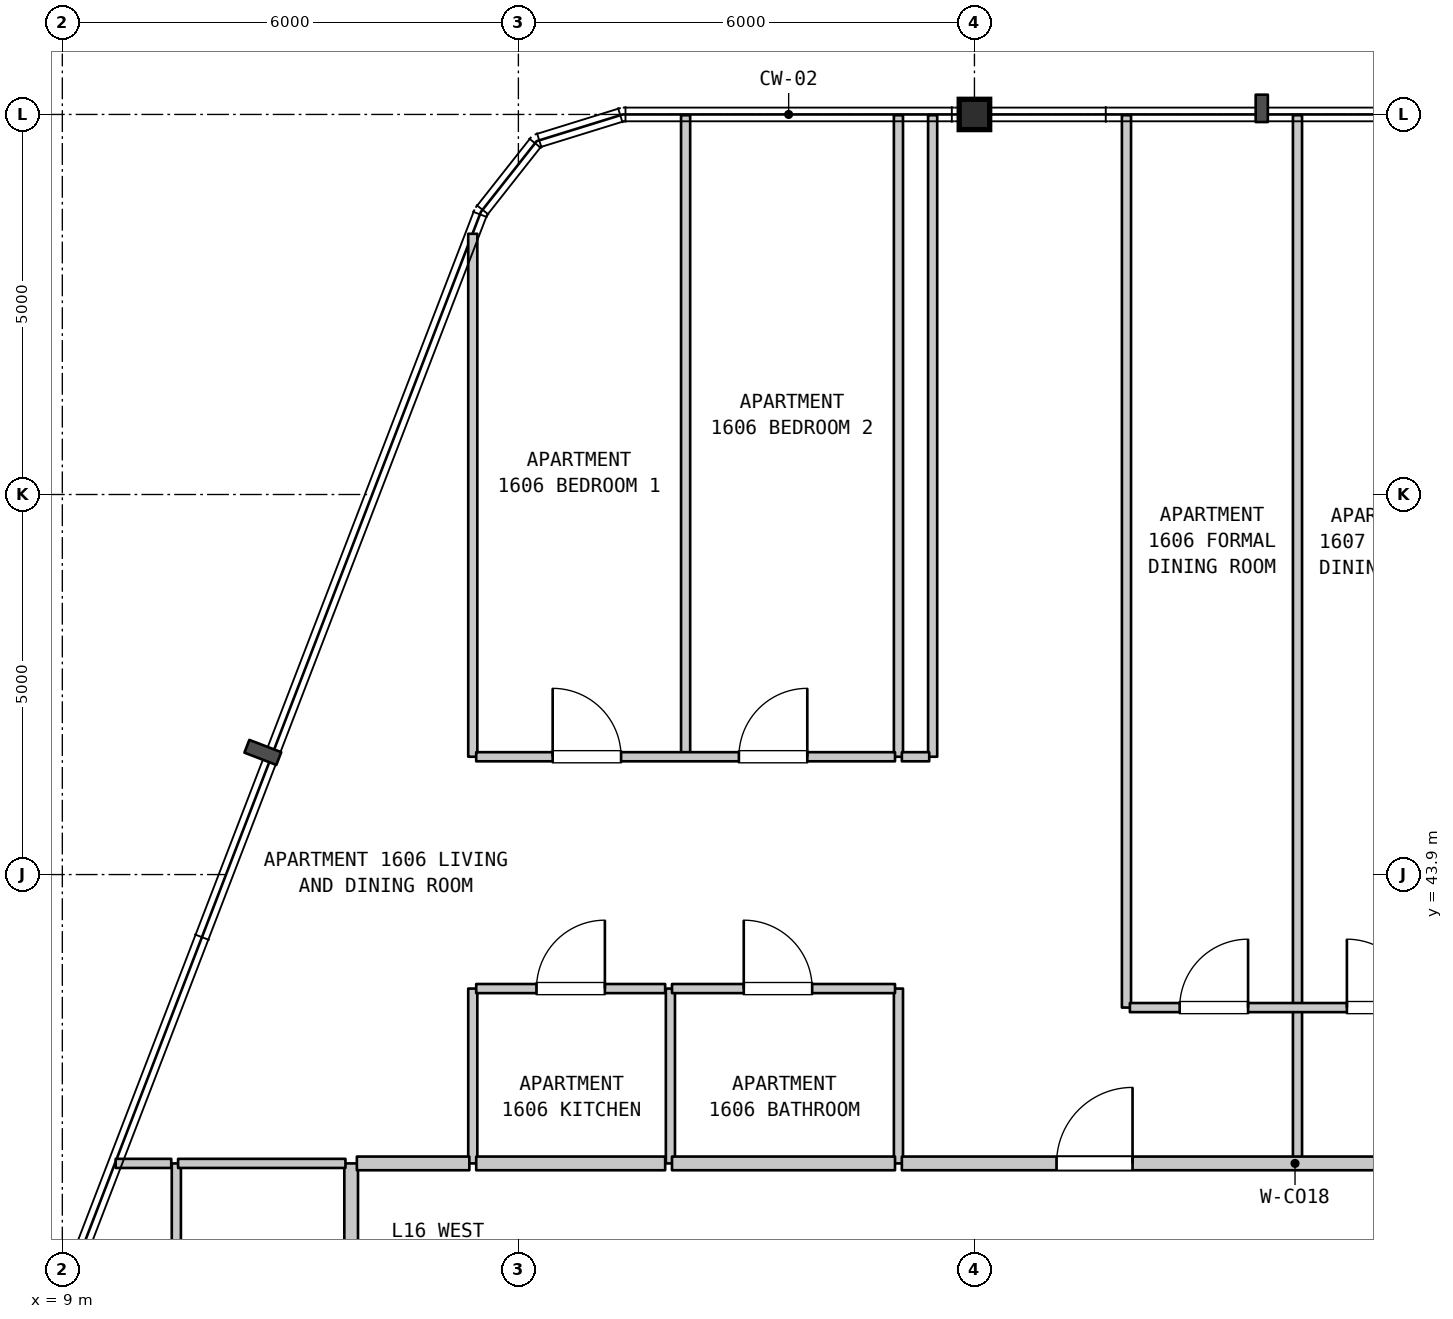
"""IFC4 building model, lengths in metres.
Left out: names, types, materials, properties, quantities, classifications, styles, units other than length and angle.
Written with IfcOpenShell. Run it as: python <this file> out.ifc"""

import sys

from ifc_helpers import new_model, si_unit, direction, frame, frame_2d, origin, origin_2d, place, context, subcontext, project, spatial, rectangle, i_section, extrude, element, fill, save


model = new_model("IFC4")
c1 = context("Model", 3, precision=1e-05, world=origin(), true_north=direction((0.0, 1.0)))
c2 = subcontext(c1, "Body", "Model", "MODEL_VIEW")
j1 = project(units=[si_unit("LENGTHUNIT", "METRE"), si_unit("PLANEANGLEUNIT", "RADIAN")], contexts=[c1])
p1 = place(None, origin())
s1 = spatial("IfcSite", under=j1, at=p1, CompositionType="ELEMENT")
p2 = place(p1, origin())
s2 = spatial("IfcBuilding", under=s1, at=p2, CompositionType="ELEMENT")
p3 = place(p2, frame((0.0, 0.0, 70.1)))
s3 = spatial("IfcBuildingStorey", under=s2, at=p3, CompositionType="ELEMENT", Elevation=70.1)
p4 = place(p3, frame((21.0, 53.9, 0.0), z_axis=(0.0, 0.0, 1.0), x_axis=(1.0, 0.0, 0.0)))
e1 = element("IfcColumn", 1, at=p4, inside=s3, PredefinedType="COLUMN", context=c2, shape_type="SweptSolid", body=[
    extrude(i_section(OverallWidth=0.401, OverallDepth=0.399, WebThickness=0.025, FlangeThickness=0.04, FilletRadius=0.015, at=origin_2d()), origin(), (0.0, 0.0, 1.0), 3.7),
])
p5 = place(p3, frame((10.5, 31.45, 0.0), z_axis=(0.0, 0.0, 1.0), x_axis=(0.0, 1.0, 0.0)))
e2 = element("IfcWall", 2, at=p5, inside=s3, PredefinedType="PARTITIONING", context=c2, shape_type="SweptSolid", body=[
    extrude(rectangle(XDim=8.65, YDim=0.12, at=frame_2d((4.325, 0.0))), origin(), (0.0, 0.0, 1.0), 3.385),
])
p6 = place(p3, frame((12.8, 31.45, 0.0), z_axis=(0.0, 0.0, 1.0), x_axis=(0.0, 1.0, 0.0)))
e3 = element("IfcWall", 3, at=p6, inside=s3, PredefinedType="STANDARD", context=c2, shape_type="SweptSolid", body=[
    extrude(rectangle(XDim=8.65, YDim=0.18, at=frame_2d((4.325, 0.0))), origin(), (0.0, 0.0, 1.0), 3.385),
])
p7 = place(p3, frame((14.4, 40.1, 0.0), z_axis=(0.0, 0.0, 1.0), x_axis=(0.0, 1.0, 0.0)))
e4 = element("IfcWall", 4, at=p7, inside=s3, PredefinedType="PARTITIONING", context=c2, shape_type="SweptSolid", body=[
    extrude(rectangle(XDim=2.3, YDim=0.12, at=frame_2d((1.15, 0.0))), origin(), (0.0, 0.0, 1.0), 3.385),
])
p8 = place(p3, frame((14.4, 45.45, 0.0), z_axis=(0.0, 0.0, 1.0), x_axis=(0.0, 1.0, 0.0)))
e5 = element("IfcWall", 5, at=p8, inside=s3, PredefinedType="PARTITIONING", context=c2, shape_type="SweptSolid", body=[
    extrude(rectangle(XDim=6.88, YDim=0.12, at=frame_2d((3.44, 0.0))), origin(), (0.0, 0.0, 1.0), 3.385),
])
p9 = place(p3, frame((17.0, 40.1, 0.0), z_axis=(0.0, 0.0, 1.0), x_axis=(0.0, 1.0, 0.0)))
e6 = element("IfcWall", 6, at=p9, inside=s3, PredefinedType="PARTITIONING", context=c2, shape_type="SweptSolid", body=[
    extrude(rectangle(XDim=2.3, YDim=0.12, at=frame_2d((1.15, 0.0))), origin(), (0.0, 0.0, 1.0), 3.385),
])
p10 = place(p3, frame((17.2, 45.45, 0.0), z_axis=(0.0, 0.0, 1.0), x_axis=(0.0, 1.0, 0.0)))
e7 = element("IfcWall", 7, at=p10, inside=s3, PredefinedType="PARTITIONING", context=c2, shape_type="SweptSolid", body=[
    extrude(rectangle(XDim=8.44, YDim=0.12, at=frame_2d((4.22, 0.0))), origin(), (0.0, 0.0, 1.0), 3.385),
])
p11 = place(p3, frame((20.0, 40.1, 0.0), z_axis=(0.0, 0.0, 1.0), x_axis=(0.0, 1.0, 0.0)))
e8 = element("IfcWall", 8, at=p11, inside=s3, PredefinedType="PARTITIONING", context=c2, shape_type="SweptSolid", body=[
    extrude(rectangle(XDim=2.3, YDim=0.12, at=frame_2d((1.15, 0.0))), origin(), (0.0, 0.0, 1.0), 3.385),
])
for number, where, z_axis, x_axis in (
    (9, (20.0, 45.45, 0.0), (0.0, 0.0, 1.0), (0.0, 1.0, 0.0)),
    (10, (20.45, 45.45, 0.0), (0.0, 0.0, 1.0), (0.0, 1.0, 0.0)),
):
    element("IfcWall", number, at=place(p3, frame(where, z_axis=z_axis, x_axis=x_axis)), inside=s3, PredefinedType="PARTITIONING", context=c2, shape_type="SweptSolid", body=[
        extrude(rectangle(XDim=8.44, YDim=0.12, at=frame_2d((4.22, 0.0))), origin(), (0.0, 0.0, 1.0), 3.385),
    ])
p12 = place(p3, frame((23.0, 42.15, 0.0), z_axis=(0.0, 0.0, 1.0), x_axis=(0.0, 1.0, 0.0)))
e11 = element("IfcWall", 11, at=p12, inside=s3, PredefinedType="PARTITIONING", context=c2, shape_type="SweptSolid", body=[
    extrude(rectangle(XDim=11.74, YDim=0.12, at=frame_2d((5.87, 0.0))), origin(), (0.0, 0.0, 1.0), 3.385),
])
p13 = place(p3, frame((25.25, 40.1, 0.0), z_axis=(0.0, 0.0, 1.0), x_axis=(0.0, 1.0, 0.0)))
e12 = element("IfcWall", 12, at=p13, inside=s3, PredefinedType="PARTITIONING", context=c2, shape_type="SweptSolid", body=[
    extrude(rectangle(XDim=2.05, YDim=0.12, at=frame_2d((1.025, 0.0))), origin(), (0.0, 0.0, 1.0), 3.385),
])
p14 = place(p3, frame((25.25, 42.15, 0.0), z_axis=(0.0, 0.0, 1.0), x_axis=(0.0, 1.0, 0.0)))
e13 = element("IfcWall", 13, at=p14, inside=s3, PredefinedType="PARTITIONING", context=c2, shape_type="SweptSolid", body=[
    extrude(rectangle(XDim=11.74, YDim=0.12, at=frame_2d((5.87, 0.0))), origin(), (0.0, 0.0, 1.0), 3.385),
])
p15 = place(p3, frame((9.702, 40.1, 0.0), z_axis=(0.0, 0.0, 1.0), x_axis=(1.0, 0.0, 0.0)))
e14 = element("IfcWall", 14, at=p15, inside=s3, PredefinedType="PARTITIONING", context=c2, shape_type="SweptSolid", body=[
    extrude(rectangle(XDim=0.731, YDim=0.12, at=frame_2d((0.366, 0.0))), origin(), (0.0, 0.0, 1.0), 3.385),
])
p16 = place(p3, frame((10.523, 40.1, 0.0), z_axis=(0.0, 0.0, 1.0), x_axis=(1.0, 0.0, 0.0)))
e15 = element("IfcWall", 15, at=p16, inside=s3, PredefinedType="PARTITIONING", context=c2, shape_type="SweptSolid", body=[
    extrude(rectangle(XDim=2.202, YDim=0.12, at=frame_2d((1.101, 0.0))), origin(), (0.0, 0.0, 1.0), 3.385),
])
p17 = place(p3, frame((12.875, 40.1, 0.0), z_axis=(0.0, 0.0, 1.0), x_axis=(1.0, 0.0, 0.0)))
e16 = element("IfcWall", 16, at=p17, inside=s3, PredefinedType="STANDARD", context=c2, shape_type="SweptSolid", body=[
    extrude(rectangle(XDim=1.48, YDim=0.18, at=frame_2d((0.74, 0.0))), origin(), (0.0, 0.0, 1.0), 3.385),
])
p18 = place(p3, frame((14.445, 40.1, 0.0), z_axis=(0.0, 0.0, 1.0), x_axis=(1.0, 0.0, 0.0)))
e17 = element("IfcWall", 17, at=p18, inside=s3, PredefinedType="STANDARD", context=c2, shape_type="SweptSolid", body=[
    extrude(rectangle(XDim=2.486, YDim=0.18, at=frame_2d((1.243, 0.0))), origin(), (0.0, 0.0, 1.0), 3.385),
])
p19 = place(p3, frame((17.021, 40.1, 0.0), z_axis=(0.0, 0.0, 1.0), x_axis=(1.0, 0.0, 0.0)))
e18 = element("IfcWall", 18, at=p19, inside=s3, PredefinedType="STANDARD", context=c2, shape_type="SweptSolid", body=[
    extrude(rectangle(XDim=2.934, YDim=0.18, at=frame_2d((1.467, 0.0))), origin(), (0.0, 0.0, 1.0), 3.385),
])
p20 = place(p3, frame((20.045, 40.1, 0.0), z_axis=(0.0, 0.0, 1.0), x_axis=(1.0, 0.0, 0.0)))
e19 = element("IfcWall", 19, at=p20, inside=s3, PredefinedType="STANDARD", context=c2, shape_type="SweptSolid", body=[
    extrude(rectangle(XDim=10.345, YDim=0.18, at=frame_2d((5.172, 0.0))), origin(), (0.0, 0.0, 1.0), 3.385),
])
p21 = place(p20, frame((2.035, 0.0, 0.0)))
e20 = element("IfcOpeningElement", 20, at=p21, cuts=e19, PredefinedType="OPENING", context=c2, shape_type="SweptSolid", body=[
    extrude(rectangle(XDim=1.0, YDim=2.15, at=frame_2d((0.5, 1.075))), frame((0.0, 0.1, 0.0), z_axis=(0.0, -1.0, 0.0), x_axis=(1.0, 0.0, 0.0)), (0.0, 0.0, 1.0), 0.2),
])
p22 = place(p20, frame((7.235, 0.0, 0.0)))
e21 = element("IfcOpeningElement", 21, at=p22, cuts=e19, PredefinedType="OPENING", context=c2, shape_type="SweptSolid", body=[
    extrude(rectangle(XDim=1.0, YDim=2.15, at=frame_2d((0.5, 1.075))), frame((0.0, 0.1, 0.0), z_axis=(0.0, -1.0, 0.0), x_axis=(1.0, 0.0, 0.0)), (0.0, 0.0, 1.0), 0.2),
])
p23 = place(p3, frame((23.045, 42.15, 0.0), z_axis=(0.0, 0.0, 1.0), x_axis=(1.0, 0.0, 0.0)))
e22 = element("IfcWall", 22, at=p23, inside=s3, PredefinedType="PARTITIONING", context=c2, shape_type="SweptSolid", body=[
    extrude(rectangle(XDim=4.41, YDim=0.12, at=frame_2d((2.205, 0.0))), origin(), (0.0, 0.0, 1.0), 3.385),
])
p24 = place(p23, frame((0.655, 0.0, 0.0)))
e23 = element("IfcOpeningElement", 23, at=p24, cuts=e22, PredefinedType="OPENING", context=c2, shape_type="SweptSolid", body=[
    extrude(rectangle(XDim=0.9, YDim=2.15, at=frame_2d((0.45, 1.075))), frame((0.0, 0.07, 0.0), z_axis=(0.0, -1.0, 0.0), x_axis=(1.0, 0.0, 0.0)), (0.0, 0.0, 1.0), 0.14),
])
p25 = place(p23, frame((2.855, 0.0, 0.0)))
e24 = element("IfcOpeningElement", 24, at=p25, cuts=e22, PredefinedType="OPENING", context=c2, shape_type="SweptSolid", body=[
    extrude(rectangle(XDim=0.9, YDim=2.15, at=frame_2d((0.45, 1.075))), frame((0.0, 0.07, 0.0), z_axis=(0.0, -1.0, 0.0), x_axis=(1.0, 0.0, 0.0)), (0.0, 0.0, 1.0), 0.14),
])
p26 = place(p3, frame((14.445, 42.4, 0.0), z_axis=(0.0, 0.0, 1.0), x_axis=(1.0, 0.0, 0.0)))
e25 = element("IfcWall", 25, at=p26, inside=s3, PredefinedType="PARTITIONING", context=c2, shape_type="SweptSolid", body=[
    extrude(rectangle(XDim=2.486, YDim=0.12, at=frame_2d((1.243, 0.0))), origin(), (0.0, 0.0, 1.0), 3.385),
])
p27 = place(p26, frame((0.793, 0.0, 0.0)))
e26 = element("IfcOpeningElement", 26, at=p27, cuts=e25, PredefinedType="OPENING", context=c2, shape_type="SweptSolid", body=[
    extrude(rectangle(XDim=0.9, YDim=2.15, at=frame_2d((0.45, 1.075))), frame((0.0, 0.07, 0.0), z_axis=(0.0, -1.0, 0.0), x_axis=(1.0, 0.0, 0.0)), (0.0, 0.0, 1.0), 0.14),
])
p28 = place(p3, frame((17.021, 42.4, 0.0), z_axis=(0.0, 0.0, 1.0), x_axis=(1.0, 0.0, 0.0)))
e27 = element("IfcWall", 27, at=p28, inside=s3, PredefinedType="PARTITIONING", context=c2, shape_type="SweptSolid", body=[
    extrude(rectangle(XDim=2.934, YDim=0.12, at=frame_2d((1.467, 0.0))), origin(), (0.0, 0.0, 1.0), 3.385),
])
p29 = place(p28, frame((0.944, 0.0, 0.0)))
e28 = element("IfcOpeningElement", 28, at=p29, cuts=e27, PredefinedType="OPENING", context=c2, shape_type="SweptSolid", body=[
    extrude(rectangle(XDim=0.9, YDim=2.1, at=frame_2d((0.45, 1.05))), frame((0.0, 0.07, 0.0), z_axis=(0.0, -1.0, 0.0), x_axis=(1.0, 0.0, 0.0)), (0.0, 0.0, 1.0), 0.14),
])
p30 = place(p3, frame((14.445, 45.45, 0.0), z_axis=(0.0, 0.0, 1.0), x_axis=(1.0, 0.0, 0.0)))
e29 = element("IfcWall", 29, at=p30, inside=s3, PredefinedType="PARTITIONING", context=c2, shape_type="SweptSolid", body=[
    extrude(rectangle(XDim=5.51, YDim=0.12, at=frame_2d((2.755, 0.0))), origin(), (0.0, 0.0, 1.0), 3.385),
])
p31 = place(p30, frame((1.006, 0.0, 0.0)))
e30 = element("IfcOpeningElement", 30, at=p31, cuts=e29, PredefinedType="OPENING", context=c2, shape_type="SweptSolid", body=[
    extrude(rectangle(XDim=0.9, YDim=2.15, at=frame_2d((0.45, 1.075))), frame((0.0, 0.07, 0.0), z_axis=(0.0, -1.0, 0.0), x_axis=(1.0, 0.0, 0.0)), (0.0, 0.0, 1.0), 0.14),
])
p32 = place(p30, frame((3.456, 0.0, 0.0)))
e31 = element("IfcOpeningElement", 31, at=p32, cuts=e29, PredefinedType="OPENING", context=c2, shape_type="SweptSolid", body=[
    extrude(rectangle(XDim=0.9, YDim=2.15, at=frame_2d((0.45, 1.075))), frame((0.0, 0.07, 0.0), z_axis=(0.0, -1.0, 0.0), x_axis=(1.0, 0.0, 0.0)), (0.0, 0.0, 1.0), 0.14),
])
p33 = place(p3, frame((20.045, 45.45, 0.0), z_axis=(0.0, 0.0, 1.0), x_axis=(1.0, 0.0, 0.0)))
e32 = element("IfcWall", 32, at=p33, inside=s3, PredefinedType="PARTITIONING", context=c2, shape_type="SweptSolid", body=[
    extrude(rectangle(XDim=0.36, YDim=0.12, at=frame_2d((0.18, 0.0))), origin(), (0.0, 0.0, 1.0), 3.385),
])
p34 = place(p21, origin())
e33 = element("IfcDoor", 33, at=p34, inside=s3, OperationType="SINGLE_SWING_RIGHT", PredefinedType="DOOR", context=c2, shape_type="SweptSolid", body=[
    extrude(rectangle(XDim=1.0, YDim=2.15, at=frame_2d((0.5, 1.075))), frame((0.0, 0.025, 0.0), z_axis=(0.0, -1.0, 0.0), x_axis=(1.0, 0.0, 0.0)), (0.0, 0.0, 1.0), 0.05),
])
fill(e20, e33)
p35 = place(p24, origin())
e34 = element("IfcDoor", 34, at=p35, inside=s3, OperationType="SINGLE_SWING_RIGHT", PredefinedType="DOOR", context=c2, shape_type="SweptSolid", body=[
    extrude(rectangle(XDim=0.9, YDim=2.15, at=frame_2d((0.45, 1.075))), frame((0.0, 0.025, 0.0), z_axis=(0.0, -1.0, 0.0), x_axis=(1.0, 0.0, 0.0)), (0.0, 0.0, 1.0), 0.05),
])
fill(e23, e34)
p36 = place(p25, origin())
e35 = element("IfcDoor", 35, at=p36, inside=s3, OperationType="SINGLE_SWING_LEFT", PredefinedType="DOOR", context=c2, shape_type="SweptSolid", body=[
    extrude(rectangle(XDim=0.9, YDim=2.15, at=frame_2d((0.45, 1.075))), frame((0.0, 0.025, 0.0), z_axis=(0.0, -1.0, 0.0), x_axis=(1.0, 0.0, 0.0)), (0.0, 0.0, 1.0), 0.05),
])
fill(e24, e35)
p37 = place(p27, origin())
e36 = element("IfcDoor", 36, at=p37, inside=s3, OperationType="SINGLE_SWING_RIGHT", PredefinedType="DOOR", context=c2, shape_type="SweptSolid", body=[
    extrude(rectangle(XDim=0.9, YDim=2.15, at=frame_2d((0.45, 1.075))), frame((0.0, 0.025, 0.0), z_axis=(0.0, -1.0, 0.0), x_axis=(1.0, 0.0, 0.0)), (0.0, 0.0, 1.0), 0.05),
])
fill(e26, e36)
p38 = place(p29, origin())
e37 = element("IfcDoor", 37, at=p38, inside=s3, OperationType="SINGLE_SWING_LEFT", PredefinedType="DOOR", context=c2, shape_type="SweptSolid", body=[
    extrude(rectangle(XDim=0.9, YDim=2.1, at=frame_2d((0.45, 1.05))), frame((0.0, 0.025, 0.0), z_axis=(0.0, -1.0, 0.0), x_axis=(1.0, 0.0, 0.0)), (0.0, 0.0, 1.0), 0.05),
])
fill(e28, e37)
p39 = place(p31, origin())
e38 = element("IfcDoor", 38, at=p39, inside=s3, OperationType="SINGLE_SWING_LEFT", PredefinedType="DOOR", context=c2, shape_type="SweptSolid", body=[
    extrude(rectangle(XDim=0.9, YDim=2.15, at=frame_2d((0.45, 1.075))), frame((0.0, 0.025, 0.0), z_axis=(0.0, -1.0, 0.0), x_axis=(1.0, 0.0, 0.0)), (0.0, 0.0, 1.0), 0.05),
])
fill(e30, e38)
p40 = place(p32, origin())
e39 = element("IfcDoor", 39, at=p40, inside=s3, OperationType="SINGLE_SWING_RIGHT", PredefinedType="DOOR", context=c2, shape_type="SweptSolid", body=[
    extrude(rectangle(XDim=0.9, YDim=2.15, at=frame_2d((0.45, 1.075))), frame((0.0, 0.025, 0.0), z_axis=(0.0, -1.0, 0.0), x_axis=(1.0, 0.0, 0.0)), (0.0, 0.0, 1.0), 0.05),
])
fill(e31, e39)
save(model, sys.argv[1])
